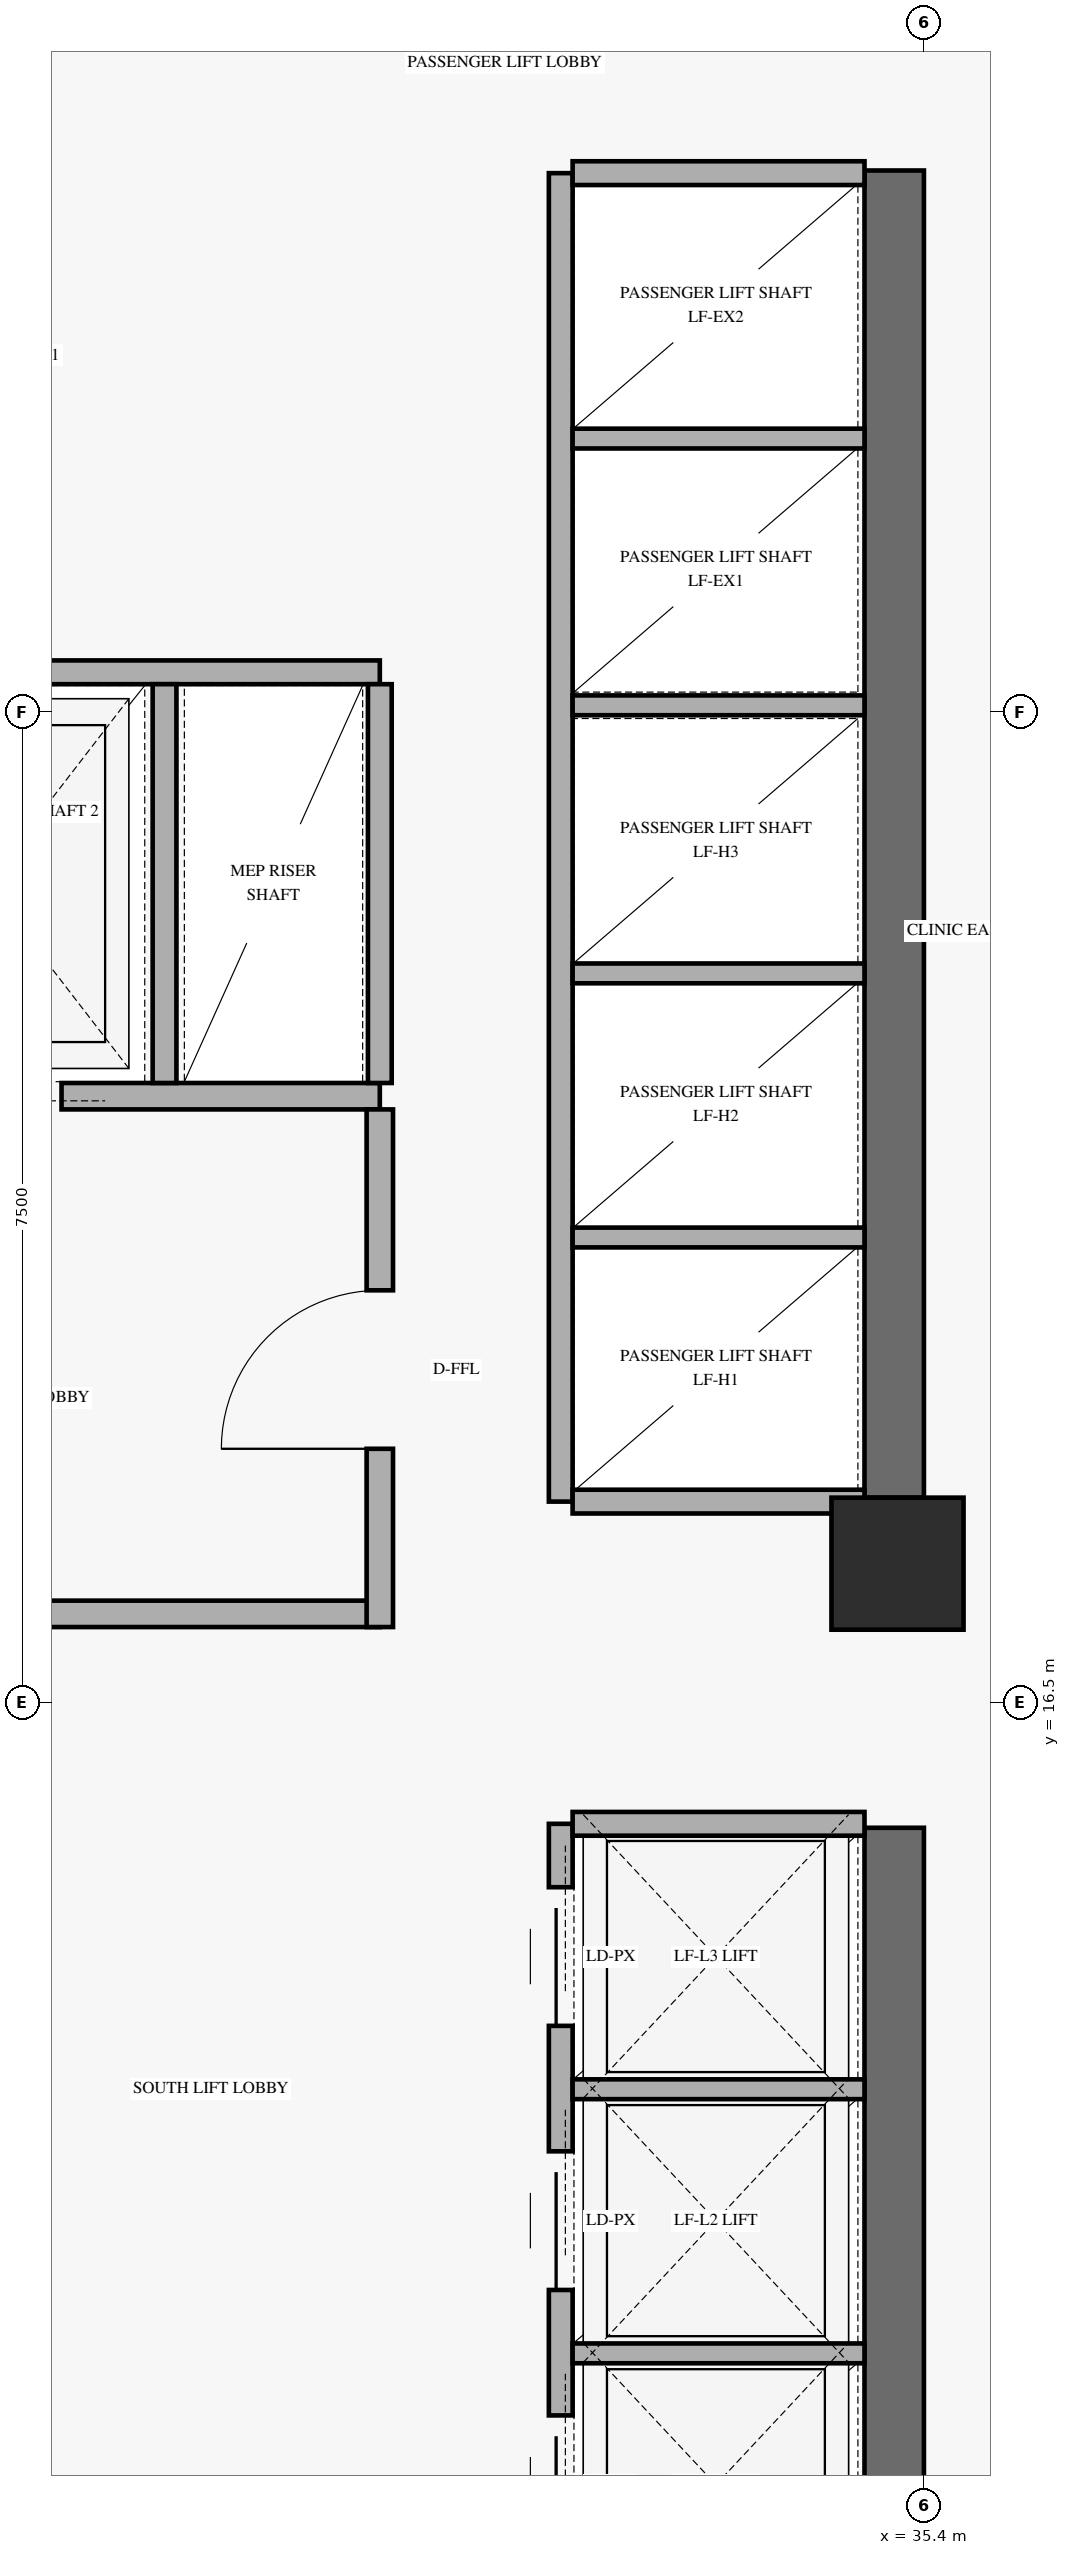
"""IFC4 building model, lengths in metres.
Left out: names, types, materials, properties, quantities, classifications, styles, units other than length and angle.
Written with IfcOpenShell. Run it as: python <this file> out.ifc"""

import sys

from ifc_helpers import new_model, si_unit, direction, frame, frame_2d, origin, origin_2d, place, context, subcontext, project, spatial, rectangle, extrude, element, fill, save


model = new_model("IFC4")
c1 = context("Model", 3, precision=1e-05, world=origin(), true_north=direction((0.0, 1.0)))
c2 = subcontext(c1, "Body", "Model", "MODEL_VIEW")
j1 = project(units=[si_unit("LENGTHUNIT", "METRE"), si_unit("PLANEANGLEUNIT", "RADIAN")], contexts=[c1])
p1 = place(None, origin())
s1 = spatial("IfcSite", under=j1, at=p1, CompositionType="ELEMENT")
p2 = place(p1, origin())
s2 = spatial("IfcBuilding", under=s1, at=p2, CompositionType="ELEMENT")
p3 = place(p2, frame((0.0, 0.0, 19.2)))
s3 = spatial("IfcBuildingStorey", under=s2, at=p3, CompositionType="ELEMENT", Elevation=19.2)
p4 = place(p3, frame((35.175, 9.75, 0.0), z_axis=(0.0, 0.0, 1.0), x_axis=(0.0, 1.0, 0.0)))
e1 = element("IfcWall", 1, at=p4, inside=s3, PredefinedType="SHEAR", context=c2, shape_type="SweptSolid", body=[
    extrude(rectangle(XDim=5.8, YDim=0.45, at=frame_2d((2.9, 0.0))), origin(), (0.0, 0.0, 1.0), 3.73),
])
p5 = place(p3, frame((35.175, 18.05, 0.0), z_axis=(0.0, 0.0, 1.0), x_axis=(0.0, 1.0, 0.0)))
e2 = element("IfcWall", 2, at=p5, inside=s3, PredefinedType="SHEAR", context=c2, shape_type="SweptSolid", body=[
    extrude(rectangle(XDim=10.05, YDim=0.45, at=frame_2d((5.025, 0.0))), origin(), (0.0, 0.0, 1.0), 3.73),
])
p6 = place(p3, frame((35.2, 17.55, 0.0), z_axis=(0.0, 0.0, 1.0), x_axis=(1.0, 0.0, 0.0)))
e3 = element("IfcColumn", 3, at=p6, inside=s3, PredefinedType="COLUMN", context=c2, shape_type="SweptSolid", body=[
    extrude(rectangle(XDim=1.0, YDim=1.0, at=origin_2d()), origin(), (0.0, 0.0, 1.0), 4.8),
])
p7 = place(p3, frame((24.45, 21.09, 0.0), z_axis=(0.0, 0.0, 1.0), x_axis=(1.0, 0.0, 0.0)))
e4 = element("IfcWall", 4, at=p7, inside=s3, PredefinedType="STANDARD", context=c2, shape_type="SweptSolid", body=[
    extrude(rectangle(XDim=6.83, YDim=0.2, at=frame_2d((3.415, 0.0))), origin(), (0.0, 0.0, 1.0), 4.5),
])
p8 = place(p7, frame((0.72, 0.0, 0.0)))
e5 = element("IfcOpeningElement", 5, at=p8, cuts=e4, PredefinedType="OPENING", context=c2, shape_type="SweptSolid", body=[
    extrude(rectangle(XDim=1.1, YDim=2.2, at=frame_2d((0.55, 1.1))), frame((0.0, 0.11, 0.0), z_axis=(0.0, -1.0, 0.0), x_axis=(1.0, 0.0, 0.0)), (0.0, 0.0, 1.0), 0.22),
])
p9 = place(p7, frame((3.32, 0.0, 0.0)))
e6 = element("IfcOpeningElement", 6, at=p9, cuts=e4, PredefinedType="OPENING", context=c2, shape_type="SweptSolid", body=[
    extrude(rectangle(XDim=1.1, YDim=2.2, at=frame_2d((0.55, 1.1))), frame((0.0, 0.11, 0.0), z_axis=(0.0, -1.0, 0.0), x_axis=(1.0, 0.0, 0.0)), (0.0, 0.0, 1.0), 0.22),
])
p10 = place(p3, frame((28.38, 17.17, 0.0), z_axis=(0.0, 0.0, 1.0), x_axis=(1.0, 0.0, 0.0)))
e7 = element("IfcWall", 7, at=p10, inside=s3, PredefinedType="STANDARD", context=c2, shape_type="SweptSolid", body=[
    extrude(rectangle(XDim=2.9, YDim=0.2, at=frame_2d((1.45, 0.0))), origin(), (0.0, 0.0, 1.0), 4.5),
])
p11 = place(p3, frame((31.28, 17.07, 0.0), z_axis=(0.0, 0.0, 1.0), x_axis=(0.0, 1.0, 0.0)))
e8 = element("IfcWall", 8, at=p11, inside=s3, PredefinedType="STANDARD", context=c2, shape_type="SweptSolid", body=[
    extrude(rectangle(XDim=3.92, YDim=0.2, at=frame_2d((1.96, 0.0))), origin(), (0.0, 0.0, 1.0), 3.555),
])
p12 = place(p11, frame((1.35, 0.0, 0.0)))
e9 = element("IfcOpeningElement", 9, at=p12, cuts=e8, PredefinedType="OPENING", context=c2, shape_type="SweptSolid", body=[
    extrude(rectangle(XDim=1.2, YDim=2.15, at=frame_2d((0.6, 1.075))), frame((0.0, 0.11, 0.0), z_axis=(0.0, -1.0, 0.0), x_axis=(1.0, 0.0, 0.0)), (0.0, 0.0, 1.0), 0.22),
])
p13 = place(p3, frame((24.45, 24.3, 0.0), z_axis=(0.0, 0.0, 1.0), x_axis=(1.0, 0.0, 0.0)))
e10 = element("IfcWall", 10, at=p13, inside=s3, PredefinedType="STANDARD", context=c2, shape_type="SweptSolid", body=[
    extrude(rectangle(XDim=6.83, YDim=0.18, at=frame_2d((3.415, 0.0))), origin(), (0.0, 0.0, 1.0), 4.5),
])
for number, where, z_axis, x_axis in (
    (11, (29.65, 21.19, 0.0), (0.0, 0.0, 1.0), (0.0, 1.0, 0.0)),
    (12, (31.28, 21.19, 0.0), (0.0, 0.0, 1.0), (0.0, 1.0, 0.0)),
):
    element("IfcWall", number, at=place(p3, frame(where, z_axis=z_axis, x_axis=x_axis)), inside=s3, PredefinedType="STANDARD", context=c2, shape_type="SweptSolid", body=[
        extrude(rectangle(XDim=3.02, YDim=0.18, at=frame_2d((1.51, 0.0))), origin(), (0.0, 0.0, 1.0), 4.5),
    ])
p14 = place(p3, frame((32.65, 9.5, 0.0), z_axis=(0.0, 0.0, 1.0), x_axis=(0.0, 1.0, 0.0)))
e13 = element("IfcWall", 13, at=p14, inside=s3, PredefinedType="STANDARD", context=c2, shape_type="SweptSolid", body=[
    extrude(rectangle(XDim=6.08, YDim=0.18, at=frame_2d((3.04, 0.0))), origin(), (0.0, 0.0, 1.0), 4.5),
])
p15 = place(p14, frame((0.55, 0.0, 0.0)))
e14 = element("IfcOpeningElement", 14, at=p15, cuts=e13, PredefinedType="OPENING", context=c2, shape_type="SweptSolid", body=[
    extrude(rectangle(XDim=1.05, YDim=2.2, at=frame_2d((0.525, 1.1))), frame((0.0, 0.1, 0.0), z_axis=(0.0, -1.0, 0.0), x_axis=(1.0, 0.0, 0.0)), (0.0, 0.0, 1.0), 0.2),
])
p16 = place(p14, frame((2.55, 0.0, 0.0)))
e15 = element("IfcOpeningElement", 15, at=p16, cuts=e13, PredefinedType="OPENING", context=c2, shape_type="SweptSolid", body=[
    extrude(rectangle(XDim=1.05, YDim=2.2, at=frame_2d((0.525, 1.1))), frame((0.0, 0.1, 0.0), z_axis=(0.0, -1.0, 0.0), x_axis=(1.0, 0.0, 0.0)), (0.0, 0.0, 1.0), 0.2),
])
p17 = place(p14, frame((4.55, 0.0, 0.0)))
e16 = element("IfcOpeningElement", 16, at=p17, cuts=e13, PredefinedType="OPENING", context=c2, shape_type="SweptSolid", body=[
    extrude(rectangle(XDim=1.05, YDim=2.2, at=frame_2d((0.525, 1.1))), frame((0.0, 0.1, 0.0), z_axis=(0.0, -1.0, 0.0), x_axis=(1.0, 0.0, 0.0)), (0.0, 0.0, 1.0), 0.2),
])
p18 = place(p3, frame((32.74, 15.58, 0.0), z_axis=(0.0, 0.0, 1.0), x_axis=(1.0, 0.0, 0.0)))
e17 = element("IfcWall", 17, at=p18, inside=s3, PredefinedType="STANDARD", context=c2, shape_type="SweptSolid", body=[
    extrude(rectangle(XDim=2.21, YDim=0.18, at=frame_2d((1.105, 0.0))), origin(), (0.0, 0.0, 1.0), 4.5),
])
for number, where, z_axis, x_axis in (
    (18, (32.74, 11.57, 0.0), (0.0, 0.0, 1.0), (1.0, 0.0, 0.0)),
    (19, (32.74, 13.57, 0.0), (0.0, 0.0, 1.0), (1.0, 0.0, 0.0)),
):
    element("IfcWall", number, at=place(p3, frame(where, z_axis=z_axis, x_axis=x_axis)), inside=s3, PredefinedType="STANDARD", context=c2, shape_type="SweptSolid", body=[
        extrude(rectangle(XDim=2.21, YDim=0.15, at=frame_2d((1.105, 0.0))), origin(), (0.0, 0.0, 1.0), 4.5),
    ])
p19 = place(p3, frame((32.65, 18.02, 0.0), z_axis=(0.0, 0.0, 1.0), x_axis=(0.0, 1.0, 0.0)))
e20 = element("IfcWall", 20, at=p19, inside=s3, PredefinedType="STANDARD", context=c2, shape_type="SweptSolid", body=[
    extrude(rectangle(XDim=10.06, YDim=0.18, at=frame_2d((5.03, 0.0))), origin(), (0.0, 0.0, 1.0), 4.5),
])
for number, where, z_axis, x_axis in (
    (21, (32.74, 18.02, 0.0), (0.0, 0.0, 1.0), (1.0, 0.0, 0.0)),
    (22, (32.74, 28.08, 0.0), (0.0, 0.0, 1.0), (1.0, 0.0, 0.0)),
):
    element("IfcWall", number, at=place(p3, frame(where, z_axis=z_axis, x_axis=x_axis)), inside=s3, PredefinedType="STANDARD", context=c2, shape_type="SweptSolid", body=[
        extrude(rectangle(XDim=2.21, YDim=0.18, at=frame_2d((1.105, 0.0))), origin(), (0.0, 0.0, 1.0), 4.5),
    ])
for number, where, z_axis, x_axis in (
    (23, (32.74, 20.02, 0.0), (0.0, 0.0, 1.0), (1.0, 0.0, 0.0)),
    (24, (32.74, 22.02, 0.0), (0.0, 0.0, 1.0), (1.0, 0.0, 0.0)),
    (25, (32.74, 24.05, 0.0), (0.0, 0.0, 1.0), (1.0, 0.0, 0.0)),
    (26, (32.74, 26.07, 0.0), (0.0, 0.0, 1.0), (1.0, 0.0, 0.0)),
):
    element("IfcWall", number, at=place(p3, frame(where, z_axis=z_axis, x_axis=x_axis)), inside=s3, PredefinedType="STANDARD", context=c2, shape_type="SweptSolid", body=[
        extrude(rectangle(XDim=2.21, YDim=0.15, at=frame_2d((1.105, 0.0))), origin(), (0.0, 0.0, 1.0), 4.5),
    ])
p20 = place(p9, origin())
e27 = element("IfcDoor", 27, at=p20, inside=s3, OperationType="SLIDING_TO_LEFT", PredefinedType="DOOR", context=c2, shape_type="SweptSolid", body=[
    extrude(rectangle(XDim=1.1, YDim=2.2, at=frame_2d((0.55, 1.1))), frame((0.0, 0.025, 0.0), z_axis=(0.0, -1.0, 0.0), x_axis=(1.0, 0.0, 0.0)), (0.0, 0.0, 1.0), 0.05),
])
fill(e6, e27)
p21 = place(p12, origin())
e28 = element("IfcDoor", 28, at=p21, inside=s3, OperationType="SINGLE_SWING_LEFT", PredefinedType="DOOR", context=c2, shape_type="SweptSolid", body=[
    extrude(rectangle(XDim=1.2, YDim=2.15, at=frame_2d((0.6, 1.075))), frame((0.0, 0.025, 0.0), z_axis=(0.0, -1.0, 0.0), x_axis=(1.0, 0.0, 0.0)), (0.0, 0.0, 1.0), 0.05),
])
fill(e9, e28)
p22 = place(p15, origin())
e29 = element("IfcDoor", 29, at=p22, inside=s3, OperationType="SLIDING_TO_LEFT", PredefinedType="DOOR", context=c2, shape_type="SweptSolid", body=[
    extrude(rectangle(XDim=1.05, YDim=2.2, at=frame_2d((0.525, 1.1))), frame((0.0, 0.025, 0.0), z_axis=(0.0, -1.0, 0.0), x_axis=(1.0, 0.0, 0.0)), (0.0, 0.0, 1.0), 0.05),
])
fill(e14, e29)
p23 = place(p16, origin())
e30 = element("IfcDoor", 30, at=p23, inside=s3, OperationType="SLIDING_TO_LEFT", PredefinedType="DOOR", context=c2, shape_type="SweptSolid", body=[
    extrude(rectangle(XDim=1.05, YDim=2.2, at=frame_2d((0.525, 1.1))), frame((0.0, 0.025, 0.0), z_axis=(0.0, -1.0, 0.0), x_axis=(1.0, 0.0, 0.0)), (0.0, 0.0, 1.0), 0.05),
])
fill(e15, e30)
p24 = place(p17, origin())
e31 = element("IfcDoor", 31, at=p24, inside=s3, OperationType="SLIDING_TO_LEFT", PredefinedType="DOOR", context=c2, shape_type="SweptSolid", body=[
    extrude(rectangle(XDim=1.05, YDim=2.2, at=frame_2d((0.525, 1.1))), frame((0.0, 0.025, 0.0), z_axis=(0.0, -1.0, 0.0), x_axis=(1.0, 0.0, 0.0)), (0.0, 0.0, 1.0), 0.05),
])
fill(e16, e31)
save(model, sys.argv[1])
